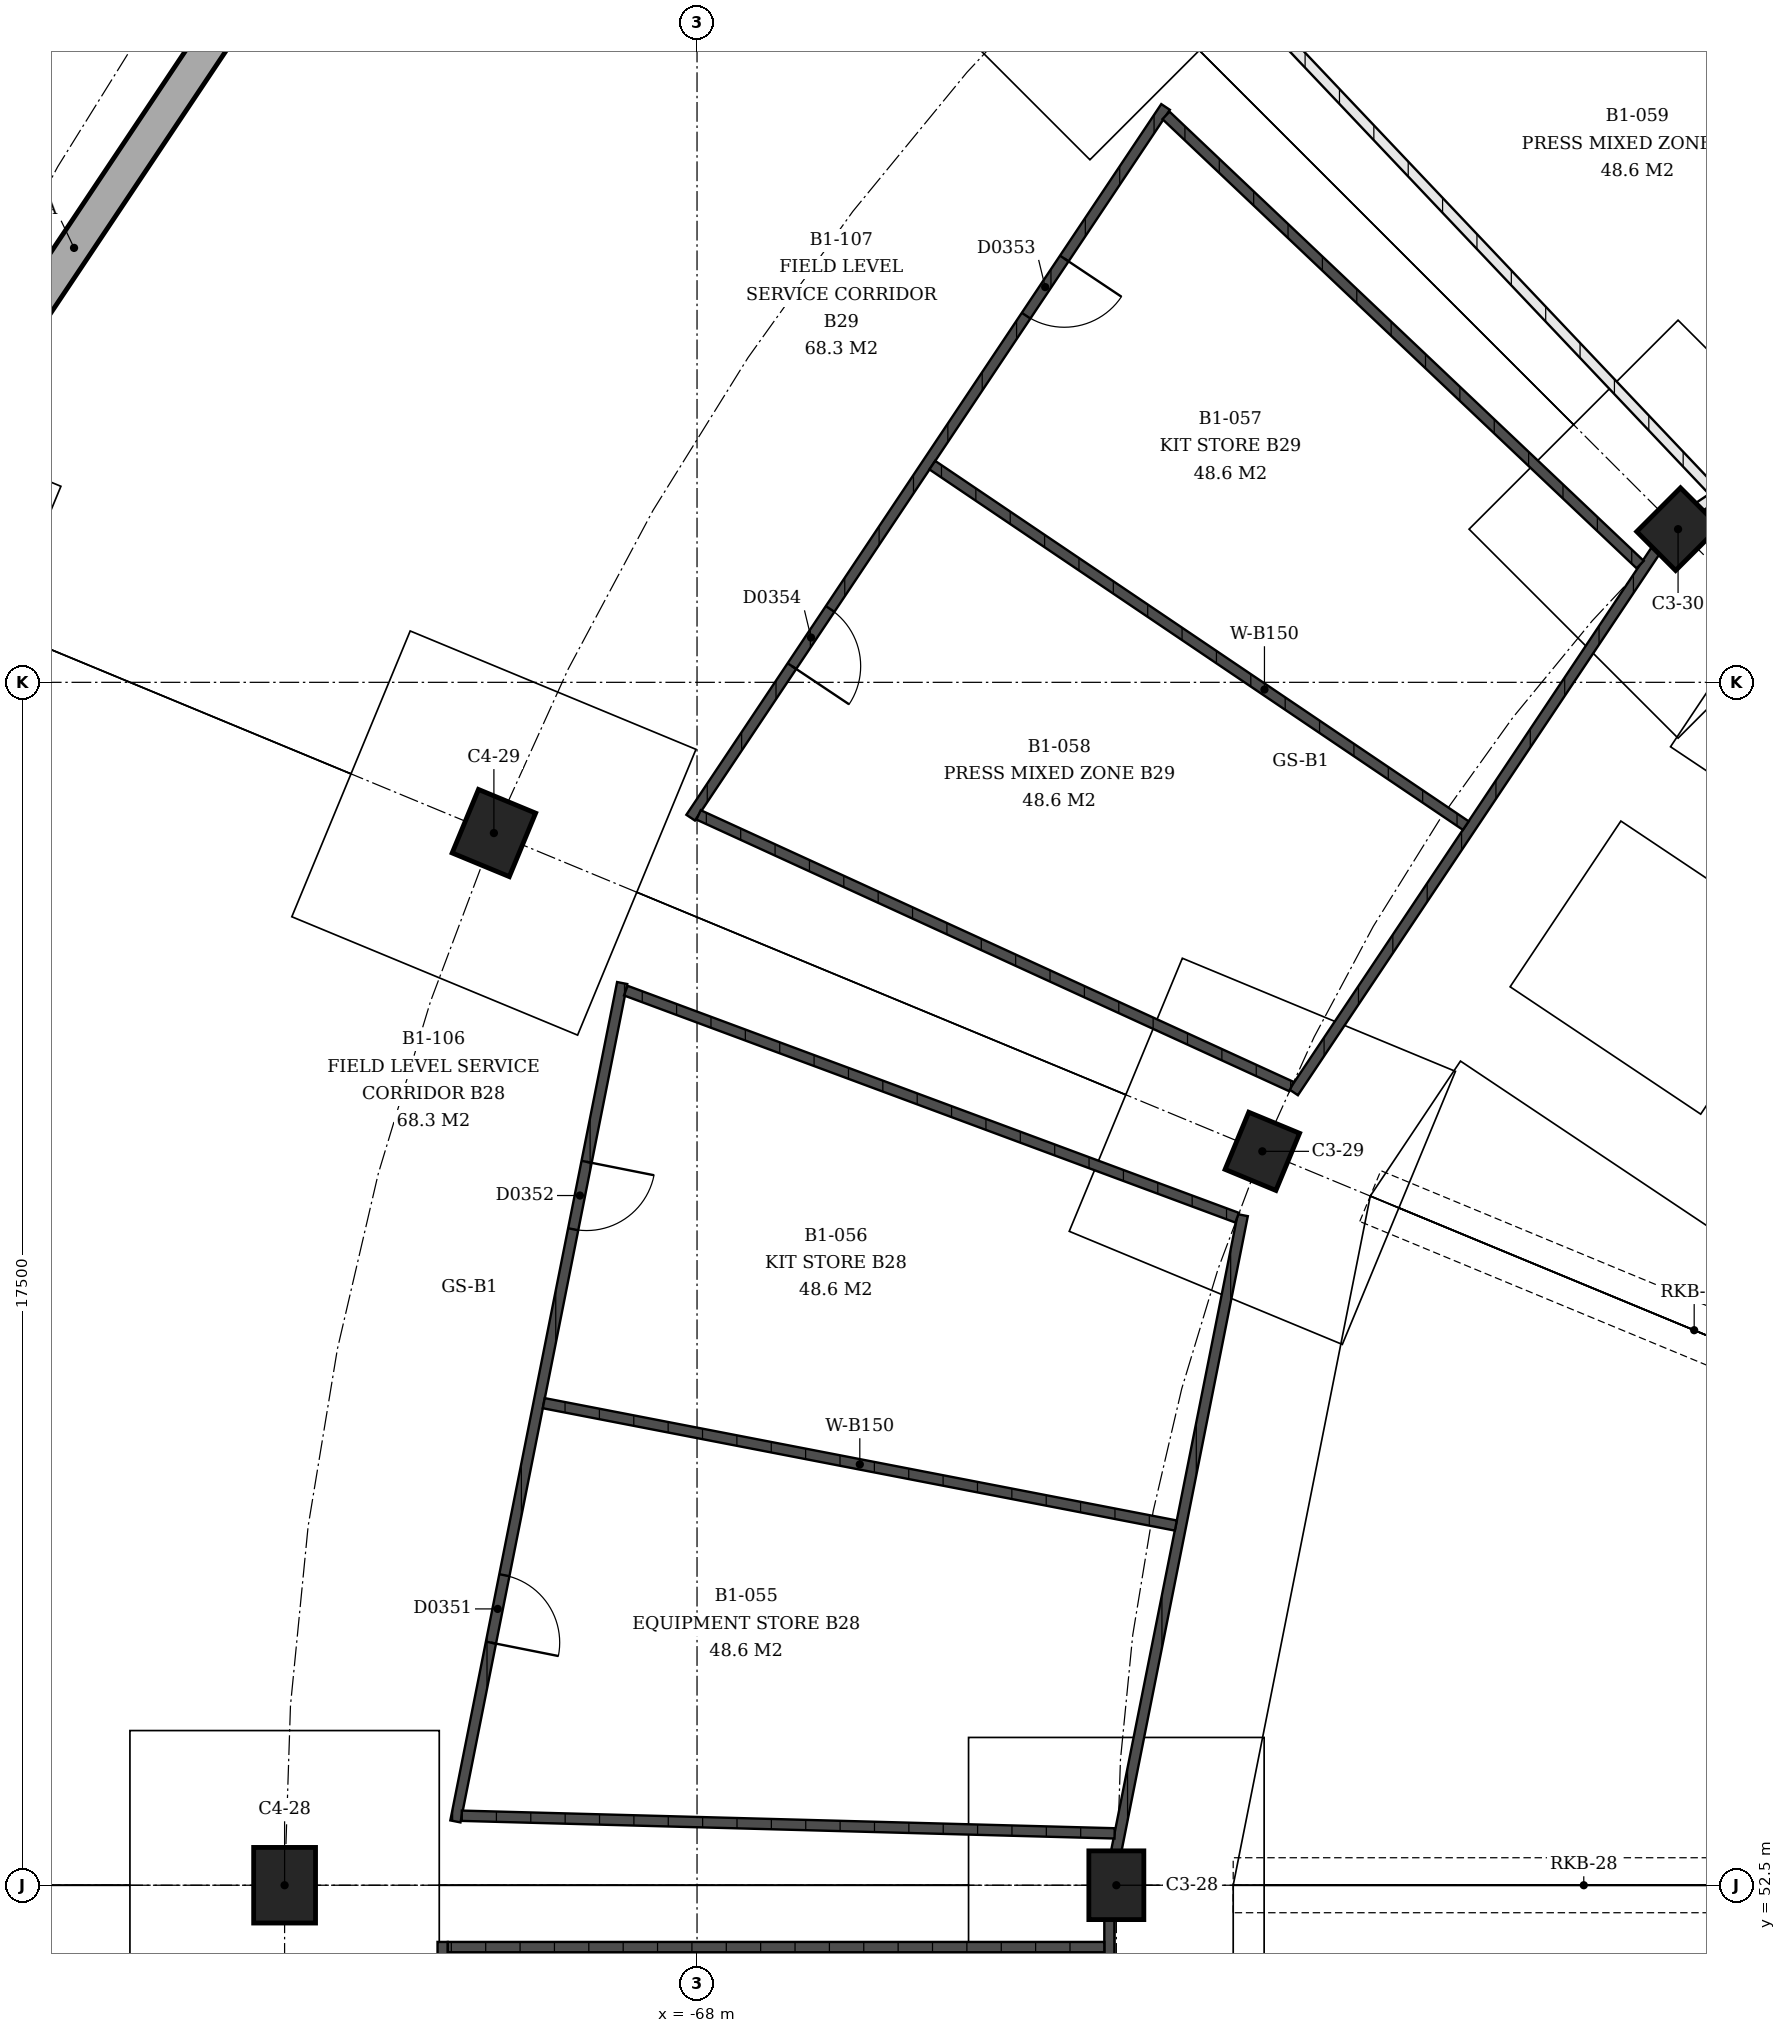
"""IFC4 building model, lengths in metres.
Left out: names, types, materials, properties, quantities, classifications, styles, units other than length and angle.
Written with IfcOpenShell. Run it as: python <this file> out.ifc"""

import sys

from ifc_helpers import new_model, si_unit, direction, frame, frame_2d, origin, origin_2d, place, context, subcontext, project, spatial, polyline, rectangle, outline, extrude, element, fill, save


model = new_model("IFC4")
c1 = context("Model", 3, precision=1e-05, world=origin(), true_north=direction((0.0, 1.0)))
c2 = subcontext(c1, "Body", "Model", "MODEL_VIEW")
j1 = project(units=[si_unit("LENGTHUNIT", "METRE"), si_unit("PLANEANGLEUNIT", "RADIAN")], contexts=[c1])
p1 = place(None, origin())
s1 = spatial("IfcSite", under=j1, at=p1, CompositionType="ELEMENT")
p2 = place(p1, origin())
s2 = spatial("IfcBuilding", under=s1, at=p2, CompositionType="ELEMENT")
p3 = place(p2, frame((0.0, 0.0, -4.5)))
s3 = spatial("IfcBuildingStorey", under=s2, at=p3, CompositionType="ELEMENT", Elevation=-4.5)
p4 = place(p3, frame((-61.9, 52.5, 0.0), z_axis=(0.0, 0.0, 1.0), x_axis=(0.0, -1.0, 0.0)))
e1 = element("IfcColumn", 1, at=p4, inside=s3, PredefinedType="COLUMN", context=c2, shape_type="SweptSolid", body=[
    extrude(rectangle(XDim=1.0, YDim=0.8, at=origin_2d()), origin(), (0.0, 0.0, 1.0), 4.5),
])
p5 = place(p3, frame((-74.0, 52.5, 0.0), z_axis=(0.0, 0.0, 1.0), x_axis=(0.0, -1.0, 0.0)))
e2 = element("IfcColumn", 2, at=p5, inside=s3, PredefinedType="COLUMN", context=c2, shape_type="SweptSolid", body=[
    extrude(rectangle(XDim=1.1, YDim=0.9, at=origin_2d()), origin(), (0.0, 0.0, 1.0), 4.5),
])
p6 = place(p3, frame((-59.776, 63.177, 0.0), z_axis=(0.0, 0.0, 1.0), x_axis=(-0.382683432365, -0.923879532511, 0.0)))
e3 = element("IfcColumn", 3, at=p6, inside=s3, PredefinedType="COLUMN", context=c2, shape_type="SweptSolid", body=[
    extrude(rectangle(XDim=0.9, YDim=0.8, at=origin_2d()), origin(), (0.0, 0.0, 1.0), 4.5),
])
p7 = place(p3, frame((-70.955, 67.807, 0.0), z_axis=(0.0, 0.0, 1.0), x_axis=(-0.382683432365, -0.923879532511, 0.0)))
e4 = element("IfcColumn", 4, at=p7, inside=s3, PredefinedType="COLUMN", context=c2, shape_type="SweptSolid", body=[
    extrude(rectangle(XDim=1.0, YDim=0.9, at=origin_2d()), origin(), (0.0, 0.0, 1.0), 4.5),
])
p8 = place(p3, frame((-53.728, 72.228, 0.0), z_axis=(0.0, 0.0, 1.0), x_axis=(-0.707106781187, -0.707106781187, 0.0)))
e5 = element("IfcColumn", 5, at=p8, inside=s3, PredefinedType="COLUMN", context=c2, shape_type="SweptSolid", body=[
    extrude(rectangle(XDim=0.9, YDim=0.8, at=origin_2d()), origin(), (0.0, 0.0, 1.0), 4.5),
])
p9 = place(p3, frame((0.0, 0.0, -0.4)))
e6 = element("IfcWall", 6, at=p9, inside=s3, PredefinedType="SOLIDWALL", context=c2, shape_type="SweptSolid", body=[
    extrude(outline(polyline([(-69.49, 87.212), (-69.844, 87.566), (-80.113, 72.196), (-79.651, 72.005), (-69.49, 87.212)])), origin(), (0.0, 0.0, 1.0), 3.19),
])
p10 = place(p3, frame((-62.0, 52.0, 0.0), z_axis=(0.0, 0.0, 1.0), x_axis=(0.0, -1.0, 0.0)))
e7 = element("IfcWall", 7, at=p10, inside=s3, PredefinedType="SOLIDWALL", context=c2, shape_type="SweptSolid", body=[
    extrude(rectangle(XDim=13.675, YDim=0.15, at=frame_2d((6.837, 0.0))), origin(), (0.0, 0.0, 1.0), 3.0),
])
p11 = place(p3, frame((-71.7, 51.675, 0.0), z_axis=(0.0, 0.0, 1.0), x_axis=(0.0, -1.0, 0.0)))
e8 = element("IfcWall", 8, at=p11, inside=s3, PredefinedType="SOLIDWALL", context=c2, shape_type="SweptSolid", body=[
    extrude(rectangle(XDim=13.35, YDim=0.15, at=frame_2d((6.675, 0.0))), origin(), (0.0, 0.0, 1.0), 3.0),
])
p12 = place(p11, frame((2.875, 0.0, 0.0)))
e9 = element("IfcOpeningElement", 9, at=p12, cuts=e8, PredefinedType="OPENING", context=c2, shape_type="SweptSolid", body=[
    extrude(rectangle(XDim=1.0, YDim=2.1, at=frame_2d((0.5, 1.05))), frame((0.0, 0.075, 0.0), z_axis=(0.0, -1.0, 0.0), x_axis=(1.0, 0.0, 0.0)), (0.0, 0.0, 1.0), 0.15),
])
p13 = place(p11, frame((9.475, 0.0, 0.0)))
e10 = element("IfcOpeningElement", 10, at=p13, cuts=e8, PredefinedType="OPENING", context=c2, shape_type="SweptSolid", body=[
    extrude(rectangle(XDim=1.0, YDim=2.1, at=frame_2d((0.5, 1.05))), frame((0.0, 0.075, 0.0), z_axis=(0.0, -1.0, 0.0), x_axis=(1.0, 0.0, 0.0)), (0.0, 0.0, 1.0), 0.15),
])
p14 = place(p3, frame((-62.075, 51.6, 0.0), z_axis=(0.0, 0.0, 1.0), x_axis=(-1.0, 0.0, 0.0)))
e11 = element("IfcWall", 11, at=p14, inside=s3, PredefinedType="SOLIDWALL", context=c2, shape_type="SweptSolid", body=[
    extrude(rectangle(XDim=9.55, YDim=0.15, at=frame_2d((4.775, 0.0))), origin(), (0.0, 0.0, 1.0), 3.0),
])
p15 = place(p3, frame((-61.901, 53.0, 0.0), z_axis=(0.0, 0.0, 1.0), x_axis=(0.195090337241, 0.980785277375, 0.0)))
e12 = element("IfcWall", 12, at=p15, inside=s3, PredefinedType="SOLIDWALL", context=c2, shape_type="SweptSolid", body=[
    extrude(rectangle(XDim=9.429, YDim=0.15, at=frame_2d((4.715, 0.0))), origin(), (0.0, 0.0, 1.0), 3.0),
])
p16 = place(p3, frame((-71.515, 53.429, 0.0), z_axis=(0.0, 0.0, 1.0), x_axis=(0.19510797715, 0.980781768414, 0.0)))
e13 = element("IfcWall", 13, at=p16, inside=s3, PredefinedType="SOLIDWALL", context=c2, shape_type="SweptSolid", body=[
    extrude(rectangle(XDim=12.436, YDim=0.15, at=frame_2d((6.218, 0.0))), origin(), (0.0, 0.0, 1.0), 3.0),
])
p17 = place(p16, frame((2.652, 0.0, 0.0)))
e14 = element("IfcOpeningElement", 14, at=p17, cuts=e13, PredefinedType="OPENING", context=c2, shape_type="SweptSolid", body=[
    extrude(rectangle(XDim=1.0, YDim=2.1, at=frame_2d((0.5, 1.05))), frame((0.0, 0.075, 0.0), z_axis=(0.0, -1.0, 0.0), x_axis=(1.0, 0.0, 0.0)), (0.0, 0.0, 1.0), 0.15),
])
p18 = place(p16, frame((8.784, 0.0, 0.0)))
e15 = element("IfcOpeningElement", 15, at=p18, cuts=e13, PredefinedType="OPENING", context=c2, shape_type="SweptSolid", body=[
    extrude(rectangle(XDim=1.0, YDim=2.1, at=frame_2d((0.5, 1.05))), frame((0.0, 0.075, 0.0), z_axis=(0.0, -1.0, 0.0), x_axis=(1.0, 0.0, 0.0)), (0.0, 0.0, 1.0), 0.15),
])
p19 = place(p3, frame((-61.925, 53.254, 0.0), z_axis=(0.0, 0.0, 1.0), x_axis=(-0.999635344856, 0.027003283405, 0.0)))
e16 = element("IfcWall", 16, at=p19, inside=s3, PredefinedType="SOLIDWALL", context=c2, shape_type="SweptSolid", body=[
    extrude(rectangle(XDim=9.502, YDim=0.15, at=frame_2d((4.751, 0.0))), origin(), (0.0, 0.0, 1.0), 3.0),
])
p20 = place(p3, frame((-61.034, 57.733, 0.0), z_axis=(0.0, 0.0, 1.0), x_axis=(-0.98177592882, 0.190042167924, 0.0)))
e17 = element("IfcWall", 17, at=p20, inside=s3, PredefinedType="SOLIDWALL", context=c2, shape_type="SweptSolid", body=[
    extrude(rectangle(XDim=9.366, YDim=0.15, at=frame_2d((4.683, 0.0))), origin(), (0.0, 0.0, 1.0), 3.0),
])
p21 = place(p3, frame((-60.143, 62.211, 0.0), z_axis=(0.0, 0.0, 1.0), x_axis=(-0.937410871216, 0.348225298515, 0.0)))
e18 = element("IfcWall", 18, at=p21, inside=s3, PredefinedType="SOLIDWALL", context=c2, shape_type="SweptSolid", body=[
    extrude(rectangle(XDim=9.487, YDim=0.15, at=frame_2d((4.743, 0.0))), origin(), (0.0, 0.0, 1.0), 3.0),
])
p22 = place(p3, frame((-54.054, 71.917, 0.0), z_axis=(0.0, 0.0, 1.0), x_axis=(-0.555561621569, -0.831475366226, 0.0)))
e19 = element("IfcWall", 19, at=p22, inside=s3, PredefinedType="SOLIDWALL", context=c2, shape_type="SweptSolid", body=[
    extrude(rectangle(XDim=9.48, YDim=0.15, at=frame_2d((4.74, 0.0))), origin(), (0.0, 0.0, 1.0), 3.0),
])
p23 = place(p3, frame((-61.184, 78.371, 0.0), z_axis=(0.0, 0.0, 1.0), x_axis=(-0.555574282091, -0.831466906785, 0.0)))
e20 = element("IfcWall", 20, at=p23, inside=s3, PredefinedType="SOLIDWALL", context=c2, shape_type="SweptSolid", body=[
    extrude(rectangle(XDim=12.436, YDim=0.15, at=frame_2d((6.218, 0.0))), origin(), (0.0, 0.0, 1.0), 3.0),
])
p24 = place(p23, frame((2.652, 0.0, 0.0)))
e21 = element("IfcOpeningElement", 21, at=p24, cuts=e20, PredefinedType="OPENING", context=c2, shape_type="SweptSolid", body=[
    extrude(rectangle(XDim=1.0, YDim=2.1, at=frame_2d((0.5, 1.05))), frame((0.0, 0.075, 0.0), z_axis=(0.0, -1.0, 0.0), x_axis=(1.0, 0.0, 0.0)), (0.0, 0.0, 1.0), 0.15),
])
p25 = place(p23, frame((8.784, 0.0, 0.0)))
e22 = element("IfcOpeningElement", 22, at=p25, cuts=e20, PredefinedType="OPENING", context=c2, shape_type="SweptSolid", body=[
    extrude(rectangle(XDim=1.0, YDim=2.1, at=frame_2d((0.5, 1.05))), frame((0.0, 0.075, 0.0), z_axis=(0.0, -1.0, 0.0), x_axis=(1.0, 0.0, 0.0)), (0.0, 0.0, 1.0), 0.15),
])
p26 = place(p3, frame((-54.279, 71.712, 0.0), z_axis=(0.0, 0.0, 1.0), x_axis=(-0.725938506053, 0.687759613114, 0.0)))
e23 = element("IfcWall", 23, at=p26, inside=s3, PredefinedType="SOLIDWALL", context=c2, shape_type="SweptSolid", body=[
    extrude(rectangle(XDim=9.502, YDim=0.15, at=frame_2d((4.751, 0.0))), origin(), (0.0, 0.0, 1.0), 3.0),
])
p27 = place(p3, frame((-56.816, 67.916, 0.0), z_axis=(0.0, 0.0, 1.0), x_axis=(-0.828597791905, 0.5598443527, 0.0)))
e24 = element("IfcWall", 24, at=p27, inside=s3, PredefinedType="SOLIDWALL", context=c2, shape_type="SweptSolid", body=[
    extrude(rectangle(XDim=9.367, YDim=0.15, at=frame_2d((4.683, 0.0))), origin(), (0.0, 0.0, 1.0), 3.0),
])
p28 = place(p3, frame((-59.353, 64.119, 0.0), z_axis=(0.0, 0.0, 1.0), x_axis=(-0.909090408533, 0.416598882755, 0.0)))
e25 = element("IfcWall", 25, at=p28, inside=s3, PredefinedType="SOLIDWALL", context=c2, shape_type="SweptSolid", body=[
    extrude(rectangle(XDim=9.487, YDim=0.15, at=frame_2d((4.743, 0.0))), origin(), (0.0, 0.0, 1.0), 3.0),
])
p29 = place(p3, frame((-53.417, 72.554, 0.0), z_axis=(0.0, 0.0, 1.0), x_axis=(0.831475366226, 0.555561621569, 0.0)))
e26 = element("IfcWall", 26, at=p29, inside=s3, PredefinedType="PARTITIONING", context=c2, shape_type="SweptSolid", body=[
    extrude(rectangle(XDim=9.48, YDim=0.15, at=frame_2d((4.74, 0.0))), origin(), (0.0, 0.0, 1.0), 3.0),
])
p30 = place(p3, frame((-53.212, 72.779, 0.0), z_axis=(0.0, 0.0, 1.0), x_axis=(-0.687759613114, 0.725938506053, 0.0)))
e27 = element("IfcWall", 27, at=p30, inside=s3, PredefinedType="PARTITIONING", context=c2, shape_type="SweptSolid", body=[
    extrude(rectangle(XDim=9.502, YDim=0.15, at=frame_2d((4.751, 0.0))), origin(), (0.0, 0.0, 1.0), 3.0),
])
p31 = place(p3, frame((-49.416, 75.316, 0.0), z_axis=(0.0, 0.0, 1.0), x_axis=(-0.5598443527, 0.828597791905, 0.0)))
e28 = element("IfcWall", 28, at=p31, inside=s3, PredefinedType="PARTITIONING", context=c2, shape_type="SweptSolid", body=[
    extrude(rectangle(XDim=9.367, YDim=0.15, at=frame_2d((4.683, 0.0))), origin(), (0.0, 0.0, 1.0), 3.0),
])
p32 = place(p17, origin())
e29 = element("IfcDoor", 29, at=p32, inside=s3, OperationType="SINGLE_SWING_LEFT", PredefinedType="DOOR", context=c2, shape_type="SweptSolid", body=[
    extrude(rectangle(XDim=1.0, YDim=2.1, at=frame_2d((0.5, 1.05))), frame((0.0, 0.025, 0.0), z_axis=(0.0, -1.0, 0.0), x_axis=(1.0, 0.0, 0.0)), (0.0, 0.0, 1.0), 0.05),
])
fill(e14, e29)
p33 = place(p18, origin())
e30 = element("IfcDoor", 30, at=p33, inside=s3, OperationType="SINGLE_SWING_RIGHT", PredefinedType="DOOR", context=c2, shape_type="SweptSolid", body=[
    extrude(rectangle(XDim=1.0, YDim=2.1, at=frame_2d((0.5, 1.05))), frame((0.0, 0.025, 0.0), z_axis=(0.0, -1.0, 0.0), x_axis=(1.0, 0.0, 0.0)), (0.0, 0.0, 1.0), 0.05),
])
fill(e15, e30)
p34 = place(p24, origin())
e31 = element("IfcDoor", 31, at=p34, inside=s3, OperationType="SINGLE_SWING_RIGHT", PredefinedType="DOOR", context=c2, shape_type="SweptSolid", body=[
    extrude(rectangle(XDim=1.0, YDim=2.1, at=frame_2d((0.5, 1.05))), frame((0.0, 0.025, 0.0), z_axis=(0.0, -1.0, 0.0), x_axis=(1.0, 0.0, 0.0)), (0.0, 0.0, 1.0), 0.05),
])
fill(e21, e31)
p35 = place(p25, origin())
e32 = element("IfcDoor", 32, at=p35, inside=s3, OperationType="SINGLE_SWING_LEFT", PredefinedType="DOOR", context=c2, shape_type="SweptSolid", body=[
    extrude(rectangle(XDim=1.0, YDim=2.1, at=frame_2d((0.5, 1.05))), frame((0.0, 0.025, 0.0), z_axis=(0.0, -1.0, 0.0), x_axis=(1.0, 0.0, 0.0)), (0.0, 0.0, 1.0), 0.05),
])
fill(e22, e32)
save(model, sys.argv[1])
